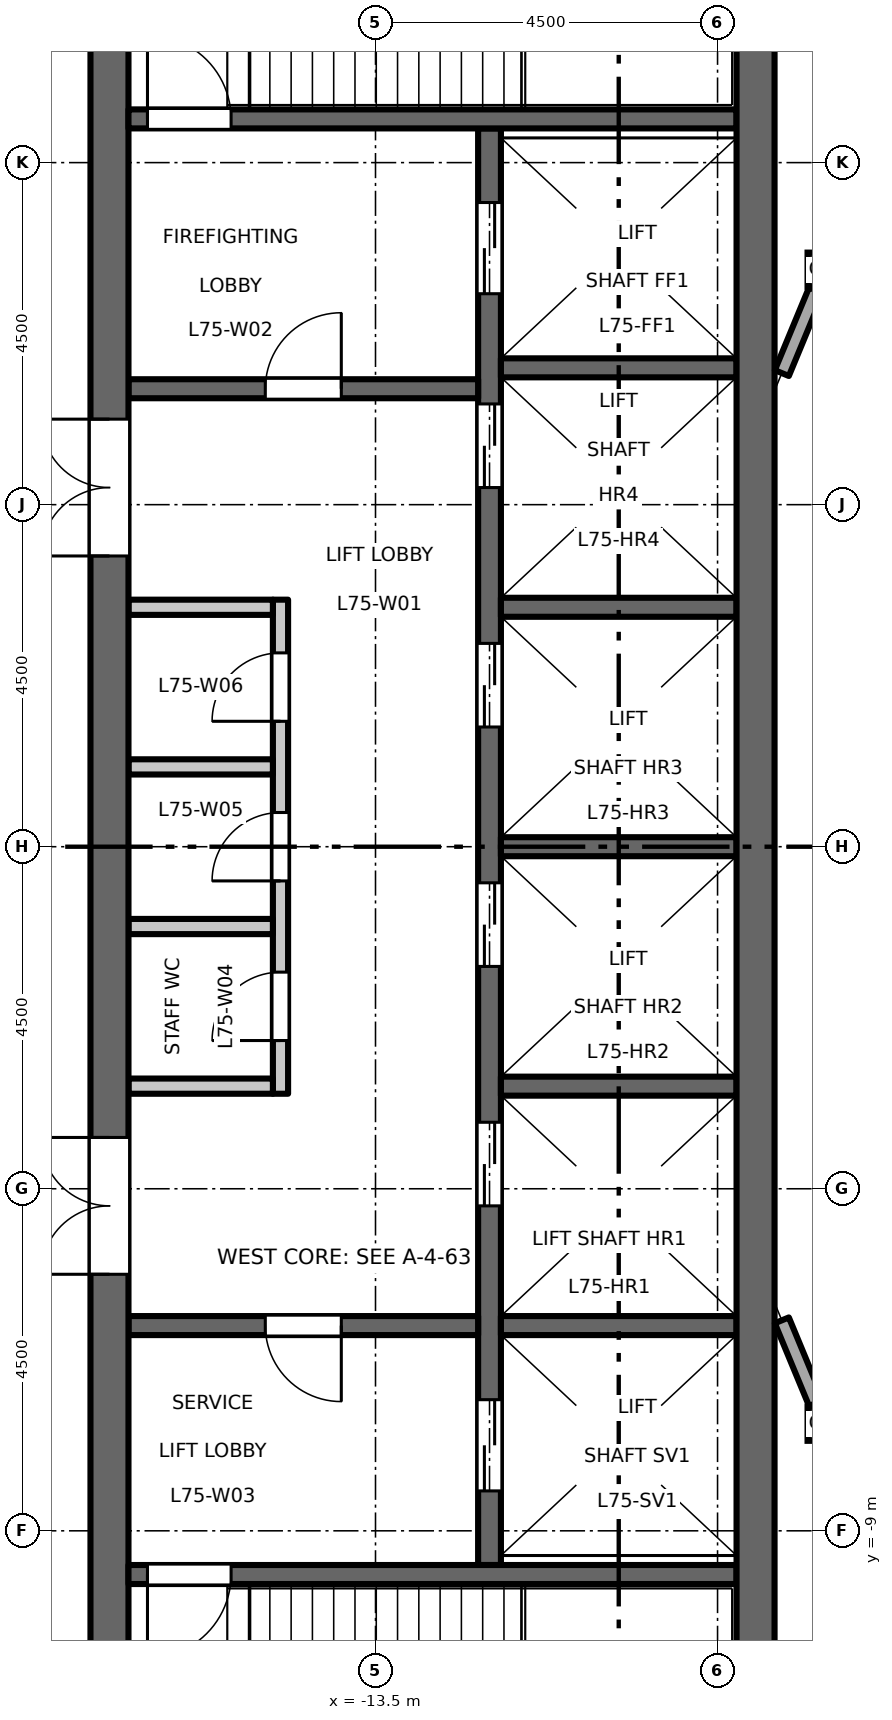
"""IFC4 building model, lengths in metres.
Left out: names, types, materials, properties, quantities, classifications, styles, units other than length and angle.
Written with IfcOpenShell. Run it as: python <this file> out.ifc"""

import sys

from ifc_helpers import new_model, si_unit, direction, frame, frame_2d, origin, origin_2d, place, context, subcontext, project, spatial, rectangle, hollow_rectangle, extrude, element, fill, save


model = new_model("IFC4")
c1 = context("Model", 3, precision=1e-05, world=origin(), true_north=direction((0.0, 1.0)))
c2 = subcontext(c1, "Body", "Model", "MODEL_VIEW")
j1 = project(units=[si_unit("LENGTHUNIT", "METRE"), si_unit("PLANEANGLEUNIT", "RADIAN")], contexts=[c1])
p1 = place(None, origin())
s1 = spatial("IfcSite", under=j1, at=p1, CompositionType="ELEMENT")
p2 = place(p1, origin())
s2 = spatial("IfcBuilding", under=s1, at=p2, CompositionType="ELEMENT")
p3 = place(p2, frame((0.0, 0.0, 348.2)))
s3 = spatial("IfcBuildingStorey", under=s2, at=p3, CompositionType="ELEMENT", Elevation=348.2)
for number, where, z_axis, x_axis in (
    (1, (-7.591, -7.591, 0.0), (0.0, 0.0, 1.0), (1.0, 0.0, 0.0)),
    (2, (-7.591, 7.591, 0.0), (0.0, 0.0, 1.0), (1.0, 0.0, 0.0)),
):
    element("IfcColumn", number, at=place(p3, frame(where, z_axis=z_axis, x_axis=x_axis)), inside=s3, PredefinedType="COLUMN", context=c2, shape_type="SweptSolid", body=[
        extrude(hollow_rectangle(XDim=0.45, YDim=0.45, WallThickness=0.022, at=origin_2d()), origin(), (0.0, 0.0, 1.0), 5.0),
    ])
p4 = place(p3, frame((-14.75, -3.25, 0.0), z_axis=(0.0, 0.0, 1.0), x_axis=(0.0, 1.0, 0.0)))
e3 = element("IfcWall", 3, at=p4, inside=s3, PredefinedType="PARTITIONING", context=c2, shape_type="SweptSolid", body=[
    extrude(rectangle(XDim=6.5, YDim=0.2, at=frame_2d((3.25, 0.0))), origin(), (0.0, 0.0, 1.0), 4.8),
])
p5 = place(p4, frame((0.7, 0.0, 0.0)))
e4 = element("IfcOpeningElement", 4, at=p5, cuts=e3, PredefinedType="OPENING", context=c2, shape_type="SweptSolid", body=[
    extrude(rectangle(XDim=0.9, YDim=2.1, at=frame_2d((0.45, 1.05))), frame((0.0, 0.11, 0.0), z_axis=(0.0, -1.0, 0.0), x_axis=(1.0, 0.0, 0.0)), (0.0, 0.0, 1.0), 0.22),
])
p6 = place(p4, frame((2.8, 0.0, 0.0)))
e5 = element("IfcOpeningElement", 5, at=p6, cuts=e3, PredefinedType="OPENING", context=c2, shape_type="SweptSolid", body=[
    extrude(rectangle(XDim=0.9, YDim=2.1, at=frame_2d((0.45, 1.05))), frame((0.0, 0.11, 0.0), z_axis=(0.0, -1.0, 0.0), x_axis=(1.0, 0.0, 0.0)), (0.0, 0.0, 1.0), 0.22),
])
p7 = place(p4, frame((4.9, 0.0, 0.0)))
e6 = element("IfcOpeningElement", 6, at=p7, cuts=e3, PredefinedType="OPENING", context=c2, shape_type="SweptSolid", body=[
    extrude(rectangle(XDim=0.9, YDim=2.1, at=frame_2d((0.45, 1.05))), frame((0.0, 0.11, 0.0), z_axis=(0.0, -1.0, 0.0), x_axis=(1.0, 0.0, 0.0)), (0.0, 0.0, 1.0), 0.22),
])
for number, where, z_axis, x_axis in (
    (7, (-14.85, 3.15, 0.0), (0.0, 0.0, 1.0), (-1.0, 0.0, 0.0)),
    (8, (-14.85, -3.15, 0.0), (0.0, 0.0, 1.0), (-1.0, 0.0, 0.0)),
    (9, (-14.85, -1.05, 0.0), (0.0, 0.0, 1.0), (-1.0, 0.0, 0.0)),
    (10, (-14.85, 1.05, 0.0), (0.0, 0.0, 1.0), (-1.0, 0.0, 0.0)),
):
    element("IfcWall", number, at=place(p3, frame(where, z_axis=z_axis, x_axis=x_axis)), inside=s3, PredefinedType="PARTITIONING", context=c2, shape_type="SweptSolid", body=[
        extrude(rectangle(XDim=1.9, YDim=0.2, at=frame_2d((0.95, 0.0))), origin(), (0.0, 0.0, 1.0), 4.8),
    ])
p8 = place(p3, frame((-12.0, -9.45, 0.0), z_axis=(0.0, 0.0, 1.0), x_axis=(0.0, 1.0, 0.0)))
e11 = element("IfcWall", 11, at=p8, inside=s3, PredefinedType="SHEAR", context=c2, shape_type="SweptSolid", body=[
    extrude(rectangle(XDim=18.9, YDim=0.3, at=frame_2d((9.45, 0.0))), origin(), (0.0, 0.0, 1.0), 4.8),
])
p9 = place(p8, frame((4.725, 0.0, 0.0)))
e12 = element("IfcOpeningElement", 12, at=p9, cuts=e11, PredefinedType="OPENING", context=c2, shape_type="SweptSolid", body=[
    extrude(rectangle(XDim=1.1, YDim=2.1, at=frame_2d((0.55, 1.05))), frame((0.0, 0.16, 0.0), z_axis=(0.0, -1.0, 0.0), x_axis=(1.0, 0.0, 0.0)), (0.0, 0.0, 1.0), 0.32),
])
p10 = place(p8, frame((7.875, 0.0, 0.0)))
e13 = element("IfcOpeningElement", 13, at=p10, cuts=e11, PredefinedType="OPENING", context=c2, shape_type="SweptSolid", body=[
    extrude(rectangle(XDim=1.1, YDim=2.1, at=frame_2d((0.55, 1.05))), frame((0.0, 0.16, 0.0), z_axis=(0.0, -1.0, 0.0), x_axis=(1.0, 0.0, 0.0)), (0.0, 0.0, 1.0), 0.32),
])
p11 = place(p8, frame((11.025, 0.0, 0.0)))
e14 = element("IfcOpeningElement", 14, at=p11, cuts=e11, PredefinedType="OPENING", context=c2, shape_type="SweptSolid", body=[
    extrude(rectangle(XDim=1.1, YDim=2.1, at=frame_2d((0.55, 1.05))), frame((0.0, 0.16, 0.0), z_axis=(0.0, -1.0, 0.0), x_axis=(1.0, 0.0, 0.0)), (0.0, 0.0, 1.0), 0.32),
])
p12 = place(p8, frame((14.175, 0.0, 0.0)))
e15 = element("IfcOpeningElement", 15, at=p12, cuts=e11, PredefinedType="OPENING", context=c2, shape_type="SweptSolid", body=[
    extrude(rectangle(XDim=1.1, YDim=2.1, at=frame_2d((0.55, 1.05))), frame((0.0, 0.16, 0.0), z_axis=(0.0, -1.0, 0.0), x_axis=(1.0, 0.0, 0.0)), (0.0, 0.0, 1.0), 0.32),
])
p13 = place(p8, frame((16.725, 0.0, 0.0)))
e16 = element("IfcOpeningElement", 16, at=p13, cuts=e11, PredefinedType="OPENING", context=c2, shape_type="SweptSolid", body=[
    extrude(rectangle(XDim=1.2, YDim=2.1, at=frame_2d((0.6, 1.05))), frame((0.0, 0.16, 0.0), z_axis=(0.0, -1.0, 0.0), x_axis=(1.0, 0.0, 0.0)), (0.0, 0.0, 1.0), 0.32),
])
p14 = place(p8, frame((0.975, 0.0, 0.0)))
e17 = element("IfcOpeningElement", 17, at=p14, cuts=e11, PredefinedType="OPENING", context=c2, shape_type="SweptSolid", body=[
    extrude(rectangle(XDim=1.2, YDim=2.1, at=frame_2d((0.6, 1.05))), frame((0.0, 0.16, 0.0), z_axis=(0.0, -1.0, 0.0), x_axis=(1.0, 0.0, 0.0)), (0.0, 0.0, 1.0), 0.32),
])
p15 = place(p3, frame((-12.15, 6.025, 0.0), z_axis=(0.0, 0.0, 1.0), x_axis=(-1.0, 0.0, 0.0)))
e18 = element("IfcWall", 18, at=p15, inside=s3, PredefinedType="SHEAR", context=c2, shape_type="SweptSolid", body=[
    extrude(rectangle(XDim=4.6, YDim=0.25, at=frame_2d((2.3, 0.0))), origin(), (0.0, 0.0, 1.0), 4.8),
])
p16 = place(p15, frame((1.8, 0.0, 0.0)))
e19 = element("IfcOpeningElement", 19, at=p16, cuts=e18, PredefinedType="OPENING", context=c2, shape_type="SweptSolid", body=[
    extrude(rectangle(XDim=1.0, YDim=2.1, at=frame_2d((0.5, 1.05))), frame((0.0, 0.135, 0.0), z_axis=(0.0, -1.0, 0.0), x_axis=(1.0, 0.0, 0.0)), (0.0, 0.0, 1.0), 0.27),
])
p17 = place(p3, frame((-12.15, -6.3, 0.0), z_axis=(0.0, 0.0, 1.0), x_axis=(-1.0, 0.0, 0.0)))
e20 = element("IfcWall", 20, at=p17, inside=s3, PredefinedType="SHEAR", context=c2, shape_type="SweptSolid", body=[
    extrude(rectangle(XDim=4.6, YDim=0.25, at=frame_2d((2.3, 0.0))), origin(), (0.0, 0.0, 1.0), 4.8),
])
p18 = place(p17, frame((1.8, 0.0, 0.0)))
e21 = element("IfcOpeningElement", 21, at=p18, cuts=e20, PredefinedType="OPENING", context=c2, shape_type="SweptSolid", body=[
    extrude(rectangle(XDim=1.0, YDim=2.1, at=frame_2d((0.5, 1.05))), frame((0.0, 0.135, 0.0), z_axis=(0.0, -1.0, 0.0), x_axis=(1.0, 0.0, 0.0)), (0.0, 0.0, 1.0), 0.27),
])
p19 = place(p3, frame((-17.0, -13.0, 0.0), z_axis=(0.0, 0.0, 1.0), x_axis=(0.0, 1.0, 0.0)))
e22 = element("IfcWall", 22, at=p19, inside=s3, PredefinedType="SHEAR", context=c2, shape_type="SweptSolid", body=[
    extrude(rectangle(XDim=26.0, YDim=0.5, at=frame_2d((13.0, 0.0))), origin(), (0.0, 0.0, 1.0), 4.8),
])
p20 = place(p19, frame((16.825, 0.0, 0.0)))
e23 = element("IfcOpeningElement", 23, at=p20, cuts=e22, PredefinedType="OPENING", context=c2, shape_type="SweptSolid", body=[
    extrude(rectangle(XDim=1.8, YDim=2.1, at=frame_2d((0.9, 1.05))), frame((0.0, 0.26, 0.0), z_axis=(0.0, -1.0, 0.0), x_axis=(1.0, 0.0, 0.0)), (0.0, 0.0, 1.0), 0.52),
])
p21 = place(p19, frame((7.375, 0.0, 0.0)))
e24 = element("IfcOpeningElement", 24, at=p21, cuts=e22, PredefinedType="OPENING", context=c2, shape_type="SweptSolid", body=[
    extrude(rectangle(XDim=1.8, YDim=2.1, at=frame_2d((0.9, 1.05))), frame((0.0, 0.26, 0.0), z_axis=(0.0, -1.0, 0.0), x_axis=(1.0, 0.0, 0.0)), (0.0, 0.0, 1.0), 0.52),
])
for number, where, z_axis, x_axis in (
    (25, (-8.75, 0.0, 0.0), (0.0, 0.0, 1.0), (-1.0, 0.0, 0.0)),
    (26, (-8.75, 3.15, 0.0), (0.0, 0.0, 1.0), (-1.0, 0.0, 0.0)),
    (27, (-8.75, 6.3, 0.0), (0.0, 0.0, 1.0), (-1.0, 0.0, 0.0)),
    (28, (-8.75, -3.15, 0.0), (0.0, 0.0, 1.0), (-1.0, 0.0, 0.0)),
    (29, (-8.75, -6.3, 0.0), (0.0, 0.0, 1.0), (-1.0, 0.0, 0.0)),
):
    element("IfcWall", number, at=place(p3, frame(where, z_axis=z_axis, x_axis=x_axis)), inside=s3, PredefinedType="SHEAR", context=c2, shape_type="SweptSolid", body=[
        extrude(rectangle(XDim=3.1, YDim=0.25, at=frame_2d((1.55, 0.0))), origin(), (0.0, 0.0, 1.0), 4.8),
    ])
p22 = place(p3, frame((-8.75, 9.575, 0.0), z_axis=(0.0, 0.0, 1.0), x_axis=(-1.0, 0.0, 0.0)))
e30 = element("IfcWall", 30, at=p22, inside=s3, PredefinedType="SHEAR", context=c2, shape_type="SweptSolid", body=[
    extrude(rectangle(XDim=8.0, YDim=0.25, at=frame_2d((4.0, 0.0))), origin(), (0.0, 0.0, 1.0), 4.8),
])
p23 = place(p22, frame((6.65, 0.0, 0.0)))
e31 = element("IfcOpeningElement", 31, at=p23, cuts=e30, PredefinedType="OPENING", context=c2, shape_type="SweptSolid", body=[
    extrude(rectangle(XDim=1.1, YDim=2.1, at=frame_2d((0.55, 1.05))), frame((0.0, 0.135, 0.0), z_axis=(0.0, -1.0, 0.0), x_axis=(1.0, 0.0, 0.0)), (0.0, 0.0, 1.0), 0.27),
])
p24 = place(p3, frame((-8.75, -9.575, 0.0), z_axis=(0.0, 0.0, 1.0), x_axis=(-1.0, 0.0, 0.0)))
e32 = element("IfcWall", 32, at=p24, inside=s3, PredefinedType="SHEAR", context=c2, shape_type="SweptSolid", body=[
    extrude(rectangle(XDim=8.0, YDim=0.25, at=frame_2d((4.0, 0.0))), origin(), (0.0, 0.0, 1.0), 4.8),
])
p25 = place(p24, frame((6.65, 0.0, 0.0)))
e33 = element("IfcOpeningElement", 33, at=p25, cuts=e32, PredefinedType="OPENING", context=c2, shape_type="SweptSolid", body=[
    extrude(rectangle(XDim=1.1, YDim=2.1, at=frame_2d((0.55, 1.05))), frame((0.0, 0.135, 0.0), z_axis=(0.0, -1.0, 0.0), x_axis=(1.0, 0.0, 0.0)), (0.0, 0.0, 1.0), 0.27),
])
p26 = place(p3, frame((-8.5, -13.0, 0.0), z_axis=(0.0, 0.0, 1.0), x_axis=(0.0, 1.0, 0.0)))
e34 = element("IfcWall", 34, at=p26, inside=s3, PredefinedType="SHEAR", context=c2, shape_type="SweptSolid", body=[
    extrude(rectangle(XDim=26.0, YDim=0.5, at=frame_2d((13.0, 0.0))), origin(), (0.0, 0.0, 1.0), 4.8),
])
for number, where, z_axis, x_axis in (
    (35, (-7.703, 7.319, 0.0), (0.0, 0.0, 1.0), (-0.383, -0.924, 0.0)),
    (36, (-8.154, -6.231, 0.0), (0.0, 0.0, 1.0), (0.383, -0.924, 0.0)),
):
    element("IfcWall", number, at=place(p3, frame(where, z_axis=z_axis, x_axis=x_axis)), inside=s3, PredefinedType="STANDARD", context=c2, shape_type="SweptSolid", body=[
        extrude(rectangle(XDim=1.178, YDim=0.2, at=frame_2d((0.589, 0.0))), origin(), (0.0, 0.0, 1.0), 4.46),
    ])
p27 = place(p16, origin())
e37 = element("IfcDoor", 37, at=p27, inside=s3, OperationType="SINGLE_SWING_LEFT", PredefinedType="DOOR", context=c2, shape_type="SweptSolid", body=[
    extrude(rectangle(XDim=1.0, YDim=2.1, at=frame_2d((0.5, 1.05))), frame((0.0, 0.025, 0.0), z_axis=(0.0, -1.0, 0.0), x_axis=(1.0, 0.0, 0.0)), (0.0, 0.0, 1.0), 0.05),
])
fill(e19, e37)
p28 = place(p18, origin())
e38 = element("IfcDoor", 38, at=p28, inside=s3, OperationType="SINGLE_SWING_RIGHT", PredefinedType="DOOR", context=c2, shape_type="SweptSolid", body=[
    extrude(rectangle(XDim=1.0, YDim=2.1, at=frame_2d((0.5, 1.05))), frame((0.0, 0.025, 0.0), z_axis=(0.0, -1.0, 0.0), x_axis=(1.0, 0.0, 0.0)), (0.0, 0.0, 1.0), 0.05),
])
fill(e21, e38)
p29 = place(p23, origin())
e39 = element("IfcDoor", 39, at=p29, inside=s3, OperationType="SINGLE_SWING_RIGHT", PredefinedType="DOOR", context=c2, shape_type="SweptSolid", body=[
    extrude(rectangle(XDim=1.1, YDim=2.1, at=frame_2d((0.55, 1.05))), frame((0.0, 0.025, 0.0), z_axis=(0.0, -1.0, 0.0), x_axis=(1.0, 0.0, 0.0)), (0.0, 0.0, 1.0), 0.05),
])
fill(e31, e39)
p30 = place(p25, origin())
e40 = element("IfcDoor", 40, at=p30, inside=s3, OperationType="SINGLE_SWING_LEFT", PredefinedType="DOOR", context=c2, shape_type="SweptSolid", body=[
    extrude(rectangle(XDim=1.1, YDim=2.1, at=frame_2d((0.55, 1.05))), frame((0.0, 0.025, 0.0), z_axis=(0.0, -1.0, 0.0), x_axis=(1.0, 0.0, 0.0)), (0.0, 0.0, 1.0), 0.05),
])
fill(e33, e40)
p31 = place(p20, origin())
e41 = element("IfcDoor", 41, at=p31, inside=s3, OperationType="DOUBLE_DOOR_DOUBLE_SWING", PredefinedType="DOOR", context=c2, shape_type="SweptSolid", body=[
    extrude(rectangle(XDim=1.8, YDim=2.1, at=frame_2d((0.9, 1.05))), frame((0.0, 0.025, 0.0), z_axis=(0.0, -1.0, 0.0), x_axis=(1.0, 0.0, 0.0)), (0.0, 0.0, 1.0), 0.05),
])
fill(e23, e41)
p32 = place(p21, origin())
e42 = element("IfcDoor", 42, at=p32, inside=s3, OperationType="DOUBLE_DOOR_DOUBLE_SWING", PredefinedType="DOOR", context=c2, shape_type="SweptSolid", body=[
    extrude(rectangle(XDim=1.8, YDim=2.1, at=frame_2d((0.9, 1.05))), frame((0.0, 0.025, 0.0), z_axis=(0.0, -1.0, 0.0), x_axis=(1.0, 0.0, 0.0)), (0.0, 0.0, 1.0), 0.05),
])
fill(e24, e42)
p33 = place(p9, origin())
e43 = element("IfcDoor", 43, at=p33, inside=s3, OperationType="DOUBLE_DOOR_SLIDING", PredefinedType="DOOR", context=c2, shape_type="SweptSolid", body=[
    extrude(rectangle(XDim=1.1, YDim=2.1, at=frame_2d((0.55, 1.05))), frame((0.0, 0.025, 0.0), z_axis=(0.0, -1.0, 0.0), x_axis=(1.0, 0.0, 0.0)), (0.0, 0.0, 1.0), 0.05),
])
fill(e12, e43)
p34 = place(p10, origin())
e44 = element("IfcDoor", 44, at=p34, inside=s3, OperationType="DOUBLE_DOOR_SLIDING", PredefinedType="DOOR", context=c2, shape_type="SweptSolid", body=[
    extrude(rectangle(XDim=1.1, YDim=2.1, at=frame_2d((0.55, 1.05))), frame((0.0, 0.025, 0.0), z_axis=(0.0, -1.0, 0.0), x_axis=(1.0, 0.0, 0.0)), (0.0, 0.0, 1.0), 0.05),
])
fill(e13, e44)
p35 = place(p11, origin())
e45 = element("IfcDoor", 45, at=p35, inside=s3, OperationType="DOUBLE_DOOR_SLIDING", PredefinedType="DOOR", context=c2, shape_type="SweptSolid", body=[
    extrude(rectangle(XDim=1.1, YDim=2.1, at=frame_2d((0.55, 1.05))), frame((0.0, 0.025, 0.0), z_axis=(0.0, -1.0, 0.0), x_axis=(1.0, 0.0, 0.0)), (0.0, 0.0, 1.0), 0.05),
])
fill(e14, e45)
p36 = place(p12, origin())
e46 = element("IfcDoor", 46, at=p36, inside=s3, OperationType="DOUBLE_DOOR_SLIDING", PredefinedType="DOOR", context=c2, shape_type="SweptSolid", body=[
    extrude(rectangle(XDim=1.1, YDim=2.1, at=frame_2d((0.55, 1.05))), frame((0.0, 0.025, 0.0), z_axis=(0.0, -1.0, 0.0), x_axis=(1.0, 0.0, 0.0)), (0.0, 0.0, 1.0), 0.05),
])
fill(e15, e46)
p37 = place(p13, origin())
e47 = element("IfcDoor", 47, at=p37, inside=s3, OperationType="DOUBLE_DOOR_SLIDING", PredefinedType="DOOR", context=c2, shape_type="SweptSolid", body=[
    extrude(rectangle(XDim=1.2, YDim=2.1, at=frame_2d((0.6, 1.05))), frame((0.0, 0.025, 0.0), z_axis=(0.0, -1.0, 0.0), x_axis=(1.0, 0.0, 0.0)), (0.0, 0.0, 1.0), 0.05),
])
fill(e16, e47)
p38 = place(p14, origin())
e48 = element("IfcDoor", 48, at=p38, inside=s3, OperationType="DOUBLE_DOOR_SLIDING", PredefinedType="DOOR", context=c2, shape_type="SweptSolid", body=[
    extrude(rectangle(XDim=1.2, YDim=2.1, at=frame_2d((0.6, 1.05))), frame((0.0, 0.025, 0.0), z_axis=(0.0, -1.0, 0.0), x_axis=(1.0, 0.0, 0.0)), (0.0, 0.0, 1.0), 0.05),
])
fill(e17, e48)
p39 = place(p5, origin())
e49 = element("IfcDoor", 49, at=p39, inside=s3, OperationType="SINGLE_SWING_RIGHT", PredefinedType="DOOR", context=c2, shape_type="SweptSolid", body=[
    extrude(rectangle(XDim=0.9, YDim=2.1, at=frame_2d((0.45, 1.05))), frame((0.0, 0.025, 0.0), z_axis=(0.0, -1.0, 0.0), x_axis=(1.0, 0.0, 0.0)), (0.0, 0.0, 1.0), 0.05),
])
fill(e4, e49)
p40 = place(p6, origin())
e50 = element("IfcDoor", 50, at=p40, inside=s3, OperationType="SINGLE_SWING_RIGHT", PredefinedType="DOOR", context=c2, shape_type="SweptSolid", body=[
    extrude(rectangle(XDim=0.9, YDim=2.1, at=frame_2d((0.45, 1.05))), frame((0.0, 0.025, 0.0), z_axis=(0.0, -1.0, 0.0), x_axis=(1.0, 0.0, 0.0)), (0.0, 0.0, 1.0), 0.05),
])
fill(e5, e50)
p41 = place(p7, origin())
e51 = element("IfcDoor", 51, at=p41, inside=s3, OperationType="SINGLE_SWING_RIGHT", PredefinedType="DOOR", context=c2, shape_type="SweptSolid", body=[
    extrude(rectangle(XDim=0.9, YDim=2.1, at=frame_2d((0.45, 1.05))), frame((0.0, 0.025, 0.0), z_axis=(0.0, -1.0, 0.0), x_axis=(1.0, 0.0, 0.0)), (0.0, 0.0, 1.0), 0.05),
])
fill(e6, e51)
save(model, sys.argv[1])
